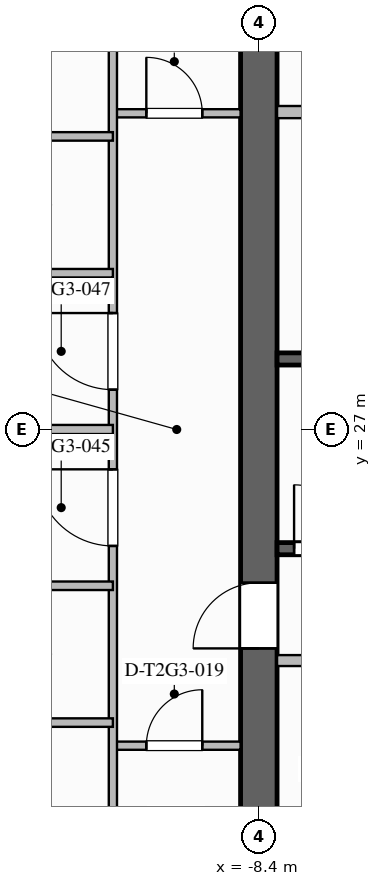
"""IFC4 building model, lengths in metres.
Left out: names, types, materials, properties, quantities, classifications, styles, units other than length and angle.
Written with IfcOpenShell. Run it as: python <this file> out.ifc"""

import sys

from ifc_helpers import new_model, si_unit, direction, frame, frame_2d, origin, place, context, subcontext, project, spatial, rectangle, extrude, element, fill, save


model = new_model("IFC4")
c1 = context("Model", 3, precision=1e-05, world=origin(), true_north=direction((0.0, 1.0)))
c2 = subcontext(c1, "Body", "Model", "MODEL_VIEW")
j1 = project(units=[si_unit("LENGTHUNIT", "METRE"), si_unit("PLANEANGLEUNIT", "RADIAN")], contexts=[c1])
p1 = place(None, origin())
s1 = spatial("IfcSite", under=j1, at=p1, CompositionType="ELEMENT")
p2 = place(p1, origin())
s2 = spatial("IfcBuilding", under=s1, at=p2, CompositionType="ELEMENT")
p3 = place(p2, frame((0.0, 0.0, 119.8)))
s3 = spatial("IfcBuildingStorey", under=s2, at=p3, CompositionType="ELEMENT", Elevation=119.8)
p4 = place(p3, frame((-8.4, 18.9, 0.0), z_axis=(0.0, 0.0, 1.0), x_axis=(0.0, 1.0, 0.0)))
e1 = element("IfcWall", 1, at=p4, inside=s3, PredefinedType="SHEAR", context=c2, shape_type="SweptSolid", body=[
    extrude(rectangle(XDim=16.2, YDim=0.6, at=frame_2d((8.1, 0.0))), origin(), (0.0, 0.0, 1.0), 3.5),
])
p5 = place(p4, frame((4.5, 0.0, 0.0)))
e2 = element("IfcOpeningElement", 2, at=p5, cuts=e1, PredefinedType="OPENING", context=c2, shape_type="SweptSolid", body=[
    extrude(rectangle(XDim=1.08, YDim=2.04, at=frame_2d((0.54, 1.02))), frame((0.0, 0.31, 0.0), z_axis=(0.0, -1.0, 0.0), x_axis=(1.0, 0.0, 0.0)), (0.0, 0.0, 1.0), 0.62),
])
p6 = place(p3, frame((-8.1, 25.04, 0.0), z_axis=(0.0, 0.0, 1.0), x_axis=(1.0, 0.0, 0.0)))
e3 = element("IfcWall", 3, at=p6, inside=s3, PredefinedType="SOLIDWALL", context=c2, shape_type="SweptSolid", body=[
    extrude(rectangle(XDim=8.1, YDim=0.2, at=frame_2d((4.05, 0.0))), origin(), (0.0, 0.0, 1.0), 3.24),
])
p7 = place(p6, frame((0.28, 0.0, 0.0)))
e4 = element("IfcOpeningElement", 4, at=p7, cuts=e3, PredefinedType="OPENING", context=c2, shape_type="SweptSolid", body=[
    extrude(rectangle(XDim=1.05, YDim=2.1, at=frame_2d((0.525, 1.05))), frame((0.0, 0.11, 0.0), z_axis=(0.0, -1.0, 0.0), x_axis=(1.0, 0.0, 0.0)), (0.0, 0.0, 1.0), 0.22),
])
p8 = place(p3, frame((-8.1, 28.16, 0.0), z_axis=(0.0, 0.0, 1.0), x_axis=(1.0, 0.0, 0.0)))
e5 = element("IfcWall", 5, at=p8, inside=s3, PredefinedType="SOLIDWALL", context=c2, shape_type="SweptSolid", body=[
    extrude(rectangle(XDim=8.1, YDim=0.2, at=frame_2d((4.05, 0.0))), origin(), (0.0, 0.0, 1.0), 3.24),
])
p9 = place(p3, frame((-8.1, 32.22, 0.0), z_axis=(0.0, 0.0, 1.0), x_axis=(1.0, 0.0, 0.0)))
e6 = element("IfcWall", 6, at=p9, inside=s3, PredefinedType="SOLIDWALL", context=c2, shape_type="SweptSolid", body=[
    extrude(rectangle(XDim=7.1, YDim=0.2, at=frame_2d((3.55, 0.0))), origin(), (0.0, 0.0, 1.0), 3.24),
])
p10 = place(p3, frame((-8.1, 23.2, 0.0), z_axis=(0.0, 0.0, 1.0), x_axis=(1.0, 0.0, 0.0)))
e7 = element("IfcWall", 7, at=p10, inside=s3, PredefinedType="SOLIDWALL", context=c2, shape_type="SweptSolid", body=[
    extrude(rectangle(XDim=8.65, YDim=0.18, at=frame_2d((4.325, 0.0))), origin(), (0.0, 0.0, 1.0), 3.24),
])
p11 = place(p10, frame((1.0, 0.0, 0.0)))
e8 = element("IfcOpeningElement", 8, at=p11, cuts=e7, PredefinedType="OPENING", context=c2, shape_type="SweptSolid", body=[
    extrude(rectangle(XDim=1.0, YDim=2.1, at=frame_2d((0.5, 1.05))), frame((0.0, 0.1, 0.0), z_axis=(0.0, -1.0, 0.0), x_axis=(1.0, 0.0, 0.0)), (0.0, 0.0, 1.0), 0.2),
])
p12 = place(p10, frame((4.0, 0.0, 0.0)))
e9 = element("IfcOpeningElement", 9, at=p12, cuts=e7, PredefinedType="OPENING", context=c2, shape_type="SweptSolid", body=[
    extrude(rectangle(XDim=1.0, YDim=2.1, at=frame_2d((0.5, 1.05))), frame((0.0, 0.1, 0.0), z_axis=(0.0, -1.0, 0.0), x_axis=(1.0, 0.0, 0.0)), (0.0, 0.0, 1.0), 0.2),
])
p13 = place(p10, frame((6.8, 0.0, 0.0)))
e10 = element("IfcOpeningElement", 10, at=p13, cuts=e7, PredefinedType="OPENING", context=c2, shape_type="SweptSolid", body=[
    extrude(rectangle(XDim=1.0, YDim=2.1, at=frame_2d((0.5, 1.05))), frame((0.0, 0.1, 0.0), z_axis=(0.0, -1.0, 0.0), x_axis=(1.0, 0.0, 0.0)), (0.0, 0.0, 1.0), 0.2),
])
p14 = place(p3, frame((-10.8, 21.8, 0.0), z_axis=(0.0, 0.0, 1.0), x_axis=(1.0, 0.0, 0.0)))
e11 = element("IfcWall", 11, at=p14, inside=s3, PredefinedType="PARTITIONING", context=c2, shape_type="SweptSolid", body=[
    extrude(rectangle(XDim=2.1, YDim=0.135, at=frame_2d((1.05, 0.0))), origin(), (0.0, 0.0, 1.0), 3.24),
])
p15 = place(p14, frame((0.55, 0.0, 0.0)))
e12 = element("IfcOpeningElement", 12, at=p15, cuts=e11, PredefinedType="OPENING", context=c2, shape_type="SweptSolid", body=[
    extrude(rectangle(XDim=0.92, YDim=2.1, at=frame_2d((0.46, 1.05))), frame((0.0, 0.077, 0.0), z_axis=(0.0, -1.0, 0.0), x_axis=(1.0, 0.0, 0.0)), (0.0, 0.0, 1.0), 0.155),
])
p16 = place(p3, frame((-10.8, 32.2, 0.0), z_axis=(0.0, 0.0, 1.0), x_axis=(1.0, 0.0, 0.0)))
e13 = element("IfcWall", 13, at=p16, inside=s3, PredefinedType="PARTITIONING", context=c2, shape_type="SweptSolid", body=[
    extrude(rectangle(XDim=2.1, YDim=0.135, at=frame_2d((1.05, 0.0))), origin(), (0.0, 0.0, 1.0), 3.24),
])
p17 = place(p16, frame((0.55, 0.0, 0.0)))
e14 = element("IfcOpeningElement", 14, at=p17, cuts=e13, PredefinedType="OPENING", context=c2, shape_type="SweptSolid", body=[
    extrude(rectangle(XDim=0.92, YDim=2.1, at=frame_2d((0.46, 1.05))), frame((0.0, 0.077, 0.0), z_axis=(0.0, -1.0, 0.0), x_axis=(1.0, 0.0, 0.0)), (0.0, 0.0, 1.0), 0.155),
])
p18 = place(p3, frame((-10.8, 18.3, 0.0), z_axis=(0.0, 0.0, 1.0), x_axis=(0.0, 1.0, 0.0)))
e15 = element("IfcWall", 15, at=p18, inside=s3, PredefinedType="PARTITIONING", context=c2, shape_type="SweptSolid", body=[
    extrude(rectangle(XDim=17.4, YDim=0.135, at=frame_2d((8.7, 0.0))), origin(), (0.0, 0.0, 1.0), 3.24),
])
p19 = place(p18, frame((6.785, 0.0, 0.0)))
e16 = element("IfcOpeningElement", 16, at=p19, cuts=e15, PredefinedType="OPENING", context=c2, shape_type="SweptSolid", body=[
    extrude(rectangle(XDim=1.26, YDim=2.2, at=frame_2d((0.63, 1.1))), frame((0.0, 0.077, 0.0), z_axis=(0.0, -1.0, 0.0), x_axis=(1.0, 0.0, 0.0)), (0.0, 0.0, 1.0), 0.155),
])
p20 = place(p18, frame((9.355, 0.0, 0.0)))
e17 = element("IfcOpeningElement", 17, at=p20, cuts=e15, PredefinedType="OPENING", context=c2, shape_type="SweptSolid", body=[
    extrude(rectangle(XDim=1.26, YDim=2.2, at=frame_2d((0.63, 1.1))), frame((0.0, 0.077, 0.0), z_axis=(0.0, -1.0, 0.0), x_axis=(1.0, 0.0, 0.0)), (0.0, 0.0, 1.0), 0.155),
])
p21 = place(p3, frame((-26.2, 27.0, 0.0), z_axis=(0.0, 0.0, 1.0), x_axis=(1.0, 0.0, 0.0)))
e18 = element("IfcWall", 18, at=p21, inside=s3, PredefinedType="PARTITIONING", context=c2, shape_type="SweptSolid", body=[
    extrude(rectangle(XDim=15.4, YDim=0.15, at=frame_2d((7.7, 0.0))), origin(), (0.0, 0.0, 1.0), 2.53),
])
for number, where, z_axis, x_axis in (
    (19, (-10.8, 22.18, 0.0), (0.0, 0.0, 1.0), (-1.0, 0.0, 0.0)),
    (20, (-10.8, 24.43, 0.0), (0.0, 0.0, 1.0), (-1.0, 0.0, 0.0)),
    (21, (-10.8, 29.57, 0.0), (0.0, 0.0, 1.0), (-1.0, 0.0, 0.0)),
    (22, (-10.8, 31.82, 0.0), (0.0, 0.0, 1.0), (-1.0, 0.0, 0.0)),
):
    element("IfcWall", number, at=place(p3, frame(where, z_axis=z_axis, x_axis=x_axis)), inside=s3, PredefinedType="PLUMBINGWALL", context=c2, shape_type="SweptSolid", body=[
        extrude(rectangle(XDim=2.15, YDim=0.14, at=frame_2d((1.075, 0.0))), origin(), (0.0, 0.0, 1.0), 3.24),
    ])
p22 = place(p7, origin())
e23 = element("IfcDoor", 23, at=p22, inside=s3, OperationType="SINGLE_SWING_LEFT", PredefinedType="DOOR", context=c2, shape_type="SweptSolid", body=[
    extrude(rectangle(XDim=1.05, YDim=2.1, at=frame_2d((0.525, 1.05))), frame((0.0, 0.025, 0.0), z_axis=(0.0, -1.0, 0.0), x_axis=(1.0, 0.0, 0.0)), (0.0, 0.0, 1.0), 0.05),
])
fill(e4, e23)
p23 = place(p5, origin())
e24 = element("IfcDoor", 24, at=p23, inside=s3, OperationType="SINGLE_SWING_LEFT", PredefinedType="DOOR", context=c2, shape_type="SweptSolid", body=[
    extrude(rectangle(XDim=1.08, YDim=2.04, at=frame_2d((0.54, 1.02))), frame((0.0, 0.025, 0.0), z_axis=(0.0, -1.0, 0.0), x_axis=(1.0, 0.0, 0.0)), (0.0, 0.0, 1.0), 0.05),
])
fill(e2, e24)
p24 = place(p15, origin())
e25 = element("IfcDoor", 25, at=p24, inside=s3, OperationType="SINGLE_SWING_RIGHT", PredefinedType="DOOR", context=c2, shape_type="SweptSolid", body=[
    extrude(rectangle(XDim=0.92, YDim=2.1, at=frame_2d((0.46, 1.05))), frame((0.0, 0.025, 0.0), z_axis=(0.0, -1.0, 0.0), x_axis=(1.0, 0.0, 0.0)), (0.0, 0.0, 1.0), 0.05),
])
fill(e12, e25)
p25 = place(p17, origin())
e26 = element("IfcDoor", 26, at=p25, inside=s3, OperationType="SINGLE_SWING_LEFT", PredefinedType="DOOR", context=c2, shape_type="SweptSolid", body=[
    extrude(rectangle(XDim=0.92, YDim=2.1, at=frame_2d((0.46, 1.05))), frame((0.0, 0.025, 0.0), z_axis=(0.0, -1.0, 0.0), x_axis=(1.0, 0.0, 0.0)), (0.0, 0.0, 1.0), 0.05),
])
fill(e14, e26)
p26 = place(p19, origin())
e27 = element("IfcDoor", 27, at=p26, inside=s3, OperationType="SINGLE_SWING_RIGHT", PredefinedType="DOOR", context=c2, shape_type="SweptSolid", body=[
    extrude(rectangle(XDim=1.26, YDim=2.2, at=frame_2d((0.63, 1.1))), frame((0.0, 0.025, 0.0), z_axis=(0.0, -1.0, 0.0), x_axis=(1.0, 0.0, 0.0)), (0.0, 0.0, 1.0), 0.05),
])
fill(e16, e27)
p27 = place(p20, origin())
e28 = element("IfcDoor", 28, at=p27, inside=s3, OperationType="SINGLE_SWING_RIGHT", PredefinedType="DOOR", context=c2, shape_type="SweptSolid", body=[
    extrude(rectangle(XDim=1.26, YDim=2.2, at=frame_2d((0.63, 1.1))), frame((0.0, 0.025, 0.0), z_axis=(0.0, -1.0, 0.0), x_axis=(1.0, 0.0, 0.0)), (0.0, 0.0, 1.0), 0.05),
])
fill(e17, e28)
save(model, sys.argv[1])
